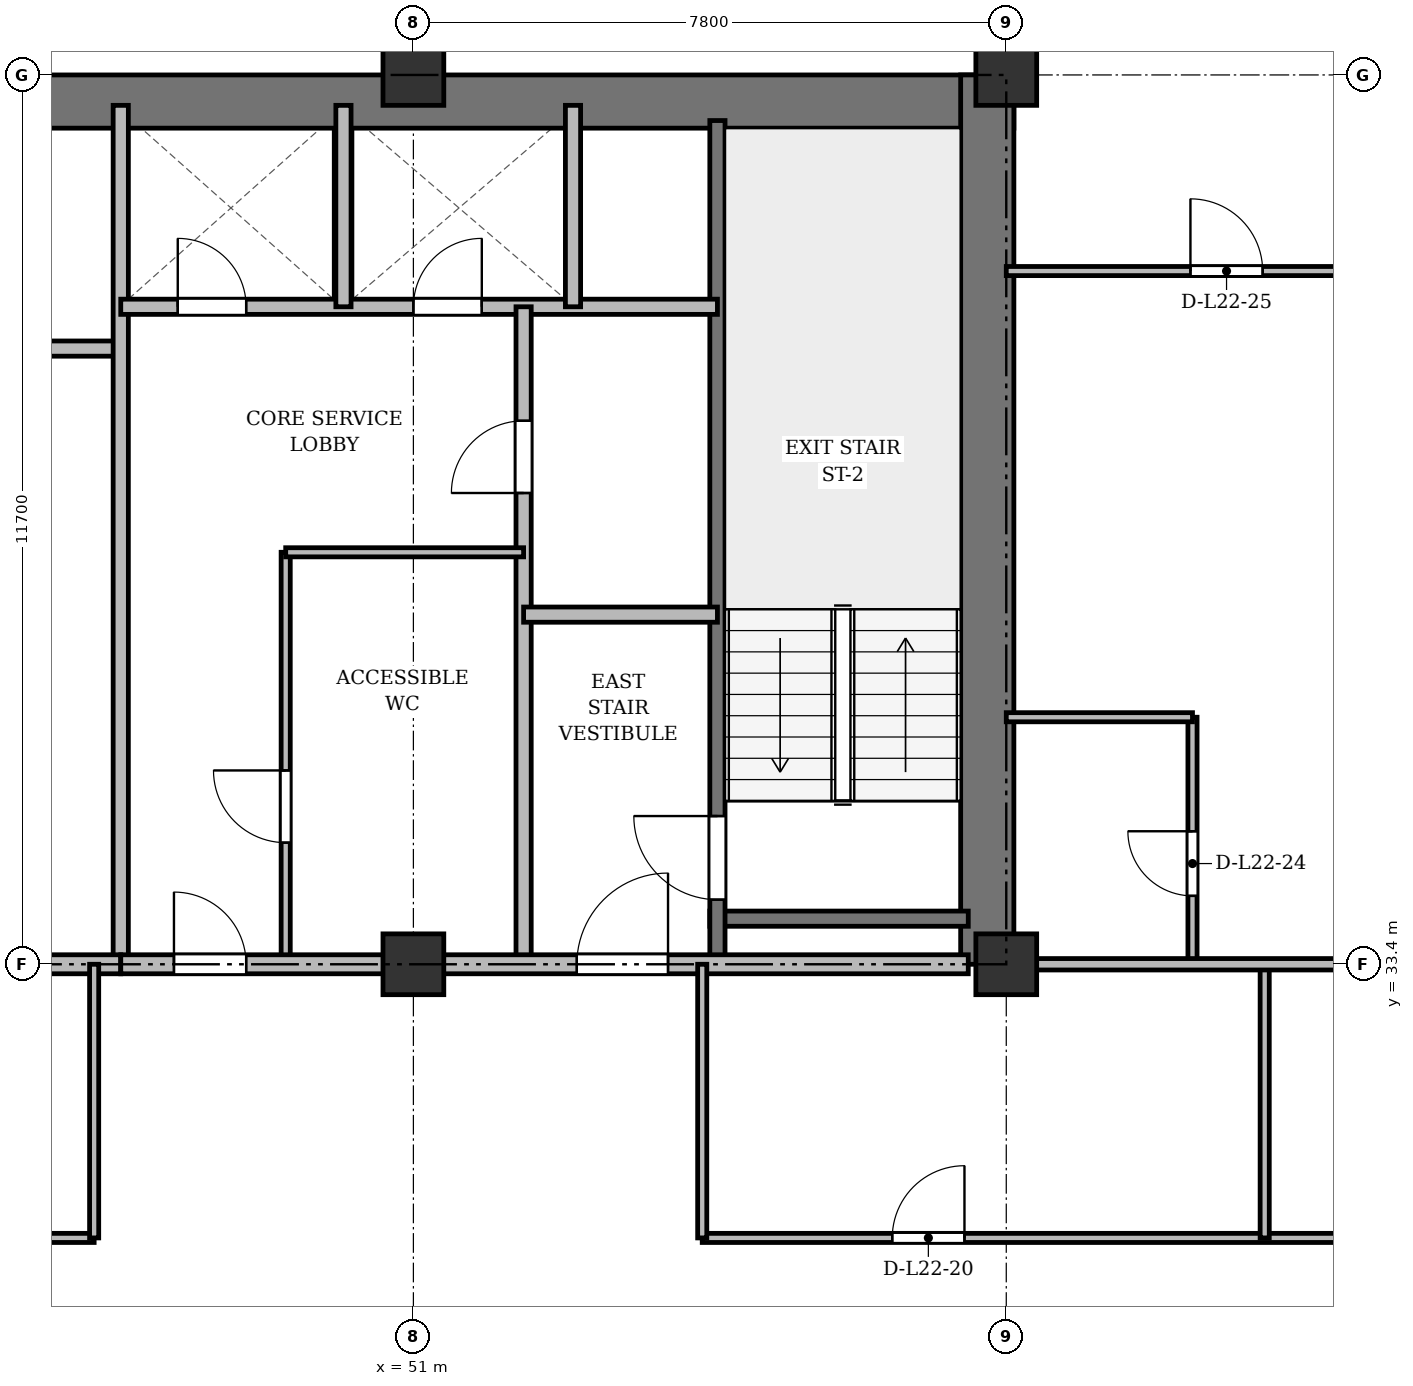
"""IFC4 building model, lengths in metres.
Left out: names, types, materials, properties, quantities, classifications, styles, units other than length and angle.
Written with IfcOpenShell. Run it as: python <this file> out.ifc"""

import sys

from ifc_helpers import new_model, si_unit, direction, frame, frame_2d, origin, origin_2d, place, context, subcontext, project, spatial, rectangle, extrude, source, transform, mapped, element, fill, save


model = new_model("IFC4")
c1 = context("Model", 3, precision=1e-05, world=origin(), true_north=direction((0.0, 1.0)))
c2 = subcontext(c1, "Body", "Model", "MODEL_VIEW")
j1 = project(units=[si_unit("LENGTHUNIT", "METRE"), si_unit("PLANEANGLEUNIT", "RADIAN")], contexts=[c1])
p1 = place(None, origin())
s1 = spatial("IfcSite", under=j1, at=p1, CompositionType="ELEMENT")
p2 = place(p1, origin())
s2 = spatial("IfcBuilding", under=s1, at=p2, CompositionType="ELEMENT")
p3 = place(p2, frame((0.0, 0.0, 88.9)))
s3 = spatial("IfcBuildingStorey", under=s2, at=p3, CompositionType="ELEMENT", Elevation=88.9)
m1 = source(origin(), c2, "Body", "SweptSolid", [
    extrude(rectangle(XDim=0.8, YDim=0.8, at=origin_2d()), origin(), (0.0, 0.0, 1.0), 3.6),
])
for number, where, z_axis, x_axis in (
    (1, (51.0, 33.4, 0.0), (0.0, 0.0, 1.0), (1.0, 0.0, 0.0)),
    (2, (51.0, 45.1, 0.0), (0.0, 0.0, 1.0), (1.0, 0.0, 0.0)),
    (3, (58.8, 33.4, 0.0), (0.0, 0.0, 1.0), (1.0, 0.0, 0.0)),
    (4, (58.8, 45.1, 0.0), (0.0, 0.0, 1.0), (1.0, 0.0, 0.0)),
):
    element("IfcColumn", number, at=place(p3, frame(where, z_axis=z_axis, x_axis=x_axis)), inside=s3, PredefinedType="COLUMN", context=c2, shape_type="MappedRepresentation", body=[
        mapped(m1, transform((0.0, 0.0, 0.0), x_axis=(1.0, 0.0, 0.0), y_axis=(0.0, 1.0, 0.0), z_axis=(0.0, 0.0, 1.0), scale=1.0)),
    ])
p4 = place(p3, frame((15.5, 44.75, 0.0), z_axis=(0.0, 0.0, 1.0), x_axis=(1.0, 0.0, 0.0)))
e5 = element("IfcWall", 5, at=p4, inside=s3, PredefinedType="SHEAR", context=c2, shape_type="SweptSolid", body=[
    extrude(rectangle(XDim=43.4, YDim=0.7, at=frame_2d((21.7, 0.0))), origin(), (0.0, 0.0, 1.0), 3.34),
])
p5 = place(p3, frame((58.55, 33.4, 0.0), z_axis=(0.0, 0.0, 1.0), x_axis=(0.0, 1.0, 0.0)))
e6 = element("IfcWall", 6, at=p5, inside=s3, PredefinedType="SHEAR", context=c2, shape_type="SweptSolid", body=[
    extrude(rectangle(XDim=11.7, YDim=0.7, at=frame_2d((5.85, 0.0))), origin(), (0.0, 0.0, 1.0), 3.34),
])
p6 = place(p3, frame((54.9, 34.0, 0.0), z_axis=(0.0, 0.0, 1.0), x_axis=(1.0, 0.0, 0.0)))
e7 = element("IfcWall", 7, at=p6, inside=s3, PredefinedType="SHEAR", context=c2, shape_type="SweptSolid", body=[
    extrude(rectangle(XDim=3.4, YDim=0.2, at=frame_2d((1.7, 0.0))), origin(), (0.0, 0.0, 1.0), 3.34),
])
p7 = place(p3, frame((55.0, 33.4, 0.0), z_axis=(0.0, 0.0, 1.0), x_axis=(0.0, 1.0, 0.0)))
e8 = element("IfcWall", 8, at=p7, inside=s3, PredefinedType="SHEAR", context=c2, shape_type="SweptSolid", body=[
    extrude(rectangle(XDim=11.1, YDim=0.2, at=frame_2d((5.55, 0.0))), origin(), (0.0, 0.0, 1.0), 3.34),
])
p8 = place(p7, frame((0.85, 0.0, 0.0)))
e9 = element("IfcOpeningElement", 9, at=p8, cuts=e8, PredefinedType="OPENING", context=c2, shape_type="SweptSolid", body=[
    extrude(rectangle(XDim=1.1, YDim=2.15, at=frame_2d((0.55, 1.075))), frame((0.0, 0.11, 0.0), z_axis=(0.0, -1.0, 0.0), x_axis=(1.0, 0.0, 0.0)), (0.0, 0.0, 1.0), 0.22),
])
p9 = place(p3, frame((40.25, 41.5, 0.0), z_axis=(0.0, 0.0, 1.0), x_axis=(1.0, 0.0, 0.0)))
e10 = element("IfcWall", 10, at=p9, inside=s3, PredefinedType="SOLIDWALL", context=c2, shape_type="SweptSolid", body=[
    extrude(rectangle(XDim=6.9, YDim=0.2, at=frame_2d((3.45, 0.0))), origin(), (0.0, 0.0, 1.0), 2.84),
])
p10 = place(p3, frame((47.15, 33.4, 0.0), z_axis=(0.0, 0.0, 1.0), x_axis=(0.0, 1.0, 0.0)))
e11 = element("IfcWall", 11, at=p10, inside=s3, PredefinedType="SOLIDWALL", context=c2, shape_type="SweptSolid", body=[
    extrude(rectangle(XDim=11.3, YDim=0.2, at=frame_2d((5.65, 0.0))), origin(), (0.0, 0.0, 1.0), 2.752),
])
p11 = place(p3, frame((26.3, 33.4, 0.0), z_axis=(0.0, 0.0, 1.0), x_axis=(1.0, 0.0, 0.0)))
e12 = element("IfcWall", 12, at=p11, inside=s3, PredefinedType="PARTITIONING", context=c2, shape_type="SweptSolid", body=[
    extrude(rectangle(XDim=20.85, YDim=0.25, at=frame_2d((10.425, 0.0))), origin(), (0.0, 0.0, 1.0), 2.752),
])
p12 = place(p11, frame((9.2, 0.0, 0.0)))
e13 = element("IfcOpeningElement", 13, at=p12, cuts=e12, PredefinedType="OPENING", context=c2, shape_type="SweptSolid", body=[
    extrude(rectangle(XDim=1.6, YDim=2.2, at=frame_2d((0.8, 1.1))), frame((0.0, 0.135, 0.0), z_axis=(0.0, -1.0, 0.0), x_axis=(1.0, 0.0, 0.0)), (0.0, 0.0, 1.0), 0.27),
])
p13 = place(p3, frame((47.15, 42.05, 0.0), z_axis=(0.0, 0.0, 1.0), x_axis=(1.0, 0.0, 0.0)))
e14 = element("IfcWall", 14, at=p13, inside=s3, PredefinedType="SOLIDWALL", context=c2, shape_type="SweptSolid", body=[
    extrude(rectangle(XDim=7.85, YDim=0.2, at=frame_2d((3.925, 0.0))), origin(), (0.0, 0.0, 1.0), 2.84),
])
p14 = place(p13, frame((0.75, 0.0, 0.0)))
e15 = element("IfcOpeningElement", 15, at=p14, cuts=e14, PredefinedType="OPENING", context=c2, shape_type="SweptSolid", body=[
    extrude(rectangle(XDim=0.9, YDim=2.1, at=frame_2d((0.45, 1.05))), frame((0.0, 0.11, 0.0), z_axis=(0.0, -1.0, 0.0), x_axis=(1.0, 0.0, 0.0)), (0.0, 0.0, 1.0), 0.22),
])
p15 = place(p13, frame((3.85, 0.0, 0.0)))
e16 = element("IfcOpeningElement", 16, at=p15, cuts=e14, PredefinedType="OPENING", context=c2, shape_type="SweptSolid", body=[
    extrude(rectangle(XDim=0.9, YDim=2.1, at=frame_2d((0.45, 1.05))), frame((0.0, 0.11, 0.0), z_axis=(0.0, -1.0, 0.0), x_axis=(1.0, 0.0, 0.0)), (0.0, 0.0, 1.0), 0.22),
])
for number, where, z_axis, x_axis in (
    (17, (50.08, 42.05, 0.0), (0.0, 0.0, 1.0), (0.0, 1.0, 0.0)),
    (18, (53.1, 42.05, 0.0), (0.0, 0.0, 1.0), (0.0, 1.0, 0.0)),
):
    element("IfcWall", number, at=place(p3, frame(where, z_axis=z_axis, x_axis=x_axis)), inside=s3, PredefinedType="SOLIDWALL", context=c2, shape_type="SweptSolid", body=[
        extrude(rectangle(XDim=2.65, YDim=0.2, at=frame_2d((1.325, 0.0))), origin(), (0.0, 0.0, 1.0), 3.34),
    ])
p16 = place(p3, frame((52.45, 33.4, 0.0), z_axis=(0.0, 0.0, 1.0), x_axis=(0.0, 1.0, 0.0)))
e19 = element("IfcWall", 19, at=p16, inside=s3, PredefinedType="PARTITIONING", context=c2, shape_type="SweptSolid", body=[
    extrude(rectangle(XDim=8.65, YDim=0.2, at=frame_2d((4.325, 0.0))), origin(), (0.0, 0.0, 1.0), 2.752),
])
p17 = place(p16, frame((6.2, 0.0, 0.0)))
e20 = element("IfcOpeningElement", 20, at=p17, cuts=e19, PredefinedType="OPENING", context=c2, shape_type="SweptSolid", body=[
    extrude(rectangle(XDim=0.95, YDim=2.15, at=frame_2d((0.475, 1.075))), frame((0.0, 0.11, 0.0), z_axis=(0.0, -1.0, 0.0), x_axis=(1.0, 0.0, 0.0)), (0.0, 0.0, 1.0), 0.22),
])
p18 = place(p3, frame((52.45, 38.0, 0.0), z_axis=(0.0, 0.0, 1.0), x_axis=(1.0, 0.0, 0.0)))
e21 = element("IfcWall", 21, at=p18, inside=s3, PredefinedType="PARTITIONING", context=c2, shape_type="SweptSolid", body=[
    extrude(rectangle(XDim=2.55, YDim=0.2, at=frame_2d((1.275, 0.0))), origin(), (0.0, 0.0, 1.0), 3.34),
])
p19 = place(p3, frame((49.32, 33.4, 0.0), z_axis=(0.0, 0.0, 1.0), x_axis=(0.0, 1.0, 0.0)))
e22 = element("IfcWall", 22, at=p19, inside=s3, PredefinedType="PARTITIONING", context=c2, shape_type="SweptSolid", body=[
    extrude(rectangle(XDim=5.42, YDim=0.12, at=frame_2d((2.71, 0.0))), origin(), (0.0, 0.0, 1.0), 2.752),
])
p20 = place(p19, frame((1.6, 0.0, 0.0)))
e23 = element("IfcOpeningElement", 23, at=p20, cuts=e22, PredefinedType="OPENING", context=c2, shape_type="SweptSolid", body=[
    extrude(rectangle(XDim=0.95, YDim=2.15, at=frame_2d((0.475, 1.075))), frame((0.0, 0.07, 0.0), z_axis=(0.0, -1.0, 0.0), x_axis=(1.0, 0.0, 0.0)), (0.0, 0.0, 1.0), 0.14),
])
p21 = place(p3, frame((49.32, 38.82, 0.0), z_axis=(0.0, 0.0, 1.0), x_axis=(1.0, 0.0, 0.0)))
e24 = element("IfcWall", 24, at=p21, inside=s3, PredefinedType="PARTITIONING", context=c2, shape_type="SweptSolid", body=[
    extrude(rectangle(XDim=3.13, YDim=0.12, at=frame_2d((1.565, 0.0))), origin(), (0.0, 0.0, 1.0), 2.84),
])
p22 = place(p3, frame((47.15, 33.4, 0.0), z_axis=(0.0, 0.0, 1.0), x_axis=(1.0, 0.0, 0.0)))
e25 = element("IfcWall", 25, at=p22, inside=s3, PredefinedType="PARTITIONING", context=c2, shape_type="SweptSolid", body=[
    extrude(rectangle(XDim=11.15, YDim=0.25, at=frame_2d((5.575, 0.0))), origin(), (0.0, 0.0, 1.0), 2.752),
])
p23 = place(p22, frame((0.7, 0.0, 0.0)))
e26 = element("IfcOpeningElement", 26, at=p23, cuts=e25, PredefinedType="OPENING", context=c2, shape_type="SweptSolid", body=[
    extrude(rectangle(XDim=0.95, YDim=2.15, at=frame_2d((0.475, 1.075))), frame((0.0, 0.135, 0.0), z_axis=(0.0, -1.0, 0.0), x_axis=(1.0, 0.0, 0.0)), (0.0, 0.0, 1.0), 0.27),
])
p24 = place(p22, frame((6.0, 0.0, 0.0)))
e27 = element("IfcOpeningElement", 27, at=p24, cuts=e25, PredefinedType="OPENING", context=c2, shape_type="SweptSolid", body=[
    extrude(rectangle(XDim=1.2, YDim=2.15, at=frame_2d((0.6, 1.075))), frame((0.0, 0.135, 0.0), z_axis=(0.0, -1.0, 0.0), x_axis=(1.0, 0.0, 0.0)), (0.0, 0.0, 1.0), 0.27),
])
p25 = place(p3, frame((38.2, 29.8, 0.0), z_axis=(0.0, 0.0, 1.0), x_axis=(1.0, 0.0, 0.0)))
e28 = element("IfcWall", 28, at=p25, inside=s3, PredefinedType="PARTITIONING", context=c2, shape_type="SweptSolid", body=[
    extrude(rectangle(XDim=8.6, YDim=0.12, at=frame_2d((4.3, 0.0))), origin(), (0.0, 0.0, 1.0), 2.84),
])
p26 = place(p25, frame((3.462, 0.0, 0.0)))
e29 = element("IfcOpeningElement", 29, at=p26, cuts=e28, PredefinedType="OPENING", context=c2, shape_type="SweptSolid", body=[
    extrude(rectangle(XDim=0.95, YDim=2.15, at=frame_2d((0.475, 1.075))), frame((0.0, 0.07, 0.0), z_axis=(0.0, -1.0, 0.0), x_axis=(1.0, 0.0, 0.0)), (0.0, 0.0, 1.0), 0.14),
])
p27 = place(p3, frame((54.8, 29.8, 0.0), z_axis=(0.0, 0.0, 1.0), x_axis=(1.0, 0.0, 0.0)))
e30 = element("IfcWall", 30, at=p27, inside=s3, PredefinedType="PARTITIONING", context=c2, shape_type="SweptSolid", body=[
    extrude(rectangle(XDim=14.85, YDim=0.12, at=frame_2d((7.425, 0.0))), origin(), (0.0, 0.0, 1.0), 2.84),
])
p28 = place(p27, frame((2.5, 0.0, 0.0)))
e31 = element("IfcOpeningElement", 31, at=p28, cuts=e30, PredefinedType="OPENING", context=c2, shape_type="SweptSolid", body=[
    extrude(rectangle(XDim=0.95, YDim=2.15, at=frame_2d((0.475, 1.075))), frame((0.0, 0.07, 0.0), z_axis=(0.0, -1.0, 0.0), x_axis=(1.0, 0.0, 0.0)), (0.0, 0.0, 1.0), 0.14),
])
p29 = place(p27, frame((9.2, 0.0, 0.0)))
e32 = element("IfcOpeningElement", 32, at=p29, cuts=e30, PredefinedType="OPENING", context=c2, shape_type="SweptSolid", body=[
    extrude(rectangle(XDim=0.95, YDim=2.15, at=frame_2d((0.475, 1.075))), frame((0.0, 0.07, 0.0), z_axis=(0.0, -1.0, 0.0), x_axis=(1.0, 0.0, 0.0)), (0.0, 0.0, 1.0), 0.14),
])
for number, where, z_axis, x_axis in (
    (33, (62.2, 29.8, 0.0), (0.0, 0.0, 1.0), (0.0, 1.0, 0.0)),
    (34, (46.8, 29.8, 0.0), (0.0, 0.0, 1.0), (0.0, 1.0, 0.0)),
    (35, (54.8, 29.8, 0.0), (0.0, 0.0, 1.0), (0.0, 1.0, 0.0)),
):
    element("IfcWall", number, at=place(p3, frame(where, z_axis=z_axis, x_axis=x_axis)), inside=s3, PredefinedType="PARTITIONING", context=c2, shape_type="SweptSolid", body=[
        extrude(rectangle(XDim=3.6, YDim=0.12, at=frame_2d((1.8, 0.0))), origin(), (0.0, 0.0, 1.0), 2.752),
    ])
p30 = place(p3, frame((61.25, 33.4, 0.0), z_axis=(0.0, 0.0, 1.0), x_axis=(0.0, 1.0, 0.0)))
e36 = element("IfcWall", 36, at=p30, inside=s3, PredefinedType="PARTITIONING", context=c2, shape_type="SweptSolid", body=[
    extrude(rectangle(XDim=3.25, YDim=0.12, at=frame_2d((1.625, 0.0))), origin(), (0.0, 0.0, 1.0), 2.752),
])
p31 = place(p30, frame((0.9, 0.0, 0.0)))
e37 = element("IfcOpeningElement", 37, at=p31, cuts=e36, PredefinedType="OPENING", context=c2, shape_type="SweptSolid", body=[
    extrude(rectangle(XDim=0.85, YDim=2.1, at=frame_2d((0.425, 1.05))), frame((0.0, 0.07, 0.0), z_axis=(0.0, -1.0, 0.0), x_axis=(1.0, 0.0, 0.0)), (0.0, 0.0, 1.0), 0.14),
])
p32 = place(p3, frame((58.8, 36.65, 0.0), z_axis=(0.0, 0.0, 1.0), x_axis=(1.0, 0.0, 0.0)))
e38 = element("IfcWall", 38, at=p32, inside=s3, PredefinedType="PARTITIONING", context=c2, shape_type="SweptSolid", body=[
    extrude(rectangle(XDim=2.45, YDim=0.12, at=frame_2d((1.225, 0.0))), origin(), (0.0, 0.0, 1.0), 2.84),
])
p33 = place(p3, frame((58.8, 42.52, 0.0), z_axis=(0.0, 0.0, 1.0), x_axis=(1.0, 0.0, 0.0)))
e39 = element("IfcWall", 39, at=p33, inside=s3, PredefinedType="PARTITIONING", context=c2, shape_type="SweptSolid", body=[
    extrude(rectangle(XDim=5.425, YDim=0.12, at=frame_2d((2.712, 0.0))), origin(), (0.0, 0.0, 1.0), 2.84),
])
p34 = place(p33, frame((2.423, 0.0, 0.0)))
e40 = element("IfcOpeningElement", 40, at=p34, cuts=e39, PredefinedType="OPENING", context=c2, shape_type="SweptSolid", body=[
    extrude(rectangle(XDim=0.95, YDim=2.15, at=frame_2d((0.475, 1.075))), frame((0.0, 0.07, 0.0), z_axis=(0.0, -1.0, 0.0), x_axis=(1.0, 0.0, 0.0)), (0.0, 0.0, 1.0), 0.14),
])
p35 = place(p3, frame((58.8, 33.4, 0.0), z_axis=(0.0, 0.0, 1.0), x_axis=(1.0, 0.0, 0.0)))
e41 = element("IfcWall", 41, at=p35, inside=s3, PredefinedType="PARTITIONING", context=c2, shape_type="SweptSolid", body=[
    extrude(rectangle(XDim=10.85, YDim=0.15, at=frame_2d((5.425, 0.0))), origin(), (0.0, 0.0, 1.0), 2.752),
])
p36 = place(p35, frame((4.933, 0.0, 0.0)))
e42 = element("IfcOpeningElement", 42, at=p36, cuts=e41, PredefinedType="OPENING", context=c2, shape_type="SweptSolid", body=[
    extrude(rectangle(XDim=0.95, YDim=2.15, at=frame_2d((0.475, 1.075))), frame((0.0, 0.085, 0.0), z_axis=(0.0, -1.0, 0.0), x_axis=(1.0, 0.0, 0.0)), (0.0, 0.0, 1.0), 0.17),
])
p37 = place(p3, frame((58.8, 44.75, 0.0), z_axis=(0.0, 0.0, 1.0), x_axis=(0.0, 1.0, 0.0)))
e43 = element("IfcWall", 43, at=p37, inside=s3, PredefinedType="PARTITIONING", context=c2, shape_type="SweptSolid", body=[
    extrude(rectangle(XDim=3.61, YDim=0.15, at=frame_2d((1.805, 0.0))), origin(), (0.0, 0.0, 1.0), 2.84),
])
p38 = place(p37, frame((1.1, 0.0, 0.0)))
e44 = element("IfcOpeningElement", 44, at=p38, cuts=e43, PredefinedType="OPENING", context=c2, shape_type="SweptSolid", body=[
    extrude(rectangle(XDim=0.95, YDim=2.15, at=frame_2d((0.475, 1.075))), frame((0.0, 0.085, 0.0), z_axis=(0.0, -1.0, 0.0), x_axis=(1.0, 0.0, 0.0)), (0.0, 0.0, 1.0), 0.17),
])
m2 = source(origin(), c2, "Body", "SweptSolid", [
    extrude(rectangle(XDim=1.1, YDim=2.15, at=frame_2d((0.55, 1.075))), frame((0.0, 0.025, 0.0), z_axis=(0.0, -1.0, 0.0), x_axis=(1.0, 0.0, 0.0)), (0.0, 0.0, 1.0), 0.05),
])
p39 = place(p8, origin())
e45 = element("IfcDoor", 45, at=p39, inside=s3, OperationType="SINGLE_SWING_RIGHT", PredefinedType="DOOR", context=c2, shape_type="MappedRepresentation", body=[
    mapped(m2, transform((0.0, 0.0, 0.0), x_axis=(1.0, 0.0, 0.0), y_axis=(0.0, 1.0, 0.0), z_axis=(0.0, 0.0, 1.0), scale=1.0)),
])
fill(e9, e45)
m3 = source(origin(), c2, "Body", "SweptSolid", [
    extrude(rectangle(XDim=0.9, YDim=2.1, at=frame_2d((0.45, 1.05))), frame((0.0, 0.025, 0.0), z_axis=(0.0, -1.0, 0.0), x_axis=(1.0, 0.0, 0.0)), (0.0, 0.0, 1.0), 0.05),
])
p40 = place(p14, origin())
e46 = element("IfcDoor", 46, at=p40, inside=s3, OperationType="SINGLE_SWING_LEFT", PredefinedType="DOOR", context=c2, shape_type="MappedRepresentation", body=[
    mapped(m3, transform((0.0, 0.0, 0.0), x_axis=(1.0, 0.0, 0.0), y_axis=(0.0, 1.0, 0.0), z_axis=(0.0, 0.0, 1.0), scale=1.0)),
])
fill(e15, e46)
p41 = place(p15, origin())
e47 = element("IfcDoor", 47, at=p41, inside=s3, OperationType="SINGLE_SWING_RIGHT", PredefinedType="DOOR", context=c2, shape_type="MappedRepresentation", body=[
    mapped(m3, transform((0.0, 0.0, 0.0), x_axis=(1.0, 0.0, 0.0), y_axis=(0.0, 1.0, 0.0), z_axis=(0.0, 0.0, 1.0), scale=1.0)),
])
fill(e16, e47)
m4 = source(origin(), c2, "Body", "SweptSolid", [
    extrude(rectangle(XDim=0.95, YDim=2.15, at=frame_2d((0.475, 1.075))), frame((0.0, 0.025, 0.0), z_axis=(0.0, -1.0, 0.0), x_axis=(1.0, 0.0, 0.0)), (0.0, 0.0, 1.0), 0.05),
])
p42 = place(p17, origin())
e48 = element("IfcDoor", 48, at=p42, inside=s3, OperationType="SINGLE_SWING_LEFT", PredefinedType="DOOR", context=c2, shape_type="MappedRepresentation", body=[
    mapped(m4, transform((0.0, 0.0, 0.0), x_axis=(1.0, 0.0, 0.0), y_axis=(0.0, 1.0, 0.0), z_axis=(0.0, 0.0, 1.0), scale=1.0)),
])
fill(e20, e48)
p43 = place(p20, origin())
e49 = element("IfcDoor", 49, at=p43, inside=s3, OperationType="SINGLE_SWING_RIGHT", PredefinedType="DOOR", context=c2, shape_type="MappedRepresentation", body=[
    mapped(m4, transform((0.0, 0.0, 0.0), x_axis=(1.0, 0.0, 0.0), y_axis=(0.0, 1.0, 0.0), z_axis=(0.0, 0.0, 1.0), scale=1.0)),
])
fill(e23, e49)
p44 = place(p23, origin())
e50 = element("IfcDoor", 50, at=p44, inside=s3, OperationType="SINGLE_SWING_LEFT", PredefinedType="DOOR", context=c2, shape_type="MappedRepresentation", body=[
    mapped(m4, transform((0.0, 0.0, 0.0), x_axis=(1.0, 0.0, 0.0), y_axis=(0.0, 1.0, 0.0), z_axis=(0.0, 0.0, 1.0), scale=1.0)),
])
fill(e26, e50)
m5 = source(origin(), c2, "Body", "SweptSolid", [
    extrude(rectangle(XDim=1.2, YDim=2.15, at=frame_2d((0.6, 1.075))), frame((0.0, 0.025, 0.0), z_axis=(0.0, -1.0, 0.0), x_axis=(1.0, 0.0, 0.0)), (0.0, 0.0, 1.0), 0.05),
])
p45 = place(p24, origin())
e51 = element("IfcDoor", 51, at=p45, inside=s3, OperationType="SINGLE_SWING_RIGHT", PredefinedType="DOOR", context=c2, shape_type="MappedRepresentation", body=[
    mapped(m5, transform((0.0, 0.0, 0.0), x_axis=(1.0, 0.0, 0.0), y_axis=(0.0, 1.0, 0.0), z_axis=(0.0, 0.0, 1.0), scale=1.0)),
])
fill(e27, e51)
p46 = place(p28, origin())
e52 = element("IfcDoor", 52, at=p46, inside=s3, OperationType="SINGLE_SWING_RIGHT", PredefinedType="DOOR", context=c2, shape_type="MappedRepresentation", body=[
    mapped(m4, transform((0.0, 0.0, 0.0), x_axis=(1.0, 0.0, 0.0), y_axis=(0.0, 1.0, 0.0), z_axis=(0.0, 0.0, 1.0), scale=1.0)),
])
fill(e31, e52)
m6 = source(origin(), c2, "Body", "SweptSolid", [
    extrude(rectangle(XDim=0.85, YDim=2.1, at=frame_2d((0.425, 1.05))), frame((0.0, 0.025, 0.0), z_axis=(0.0, -1.0, 0.0), x_axis=(1.0, 0.0, 0.0)), (0.0, 0.0, 1.0), 0.05),
])
p47 = place(p31, origin())
e53 = element("IfcDoor", 53, at=p47, inside=s3, OperationType="SINGLE_SWING_RIGHT", PredefinedType="DOOR", context=c2, shape_type="MappedRepresentation", body=[
    mapped(m6, transform((0.0, 0.0, 0.0), x_axis=(1.0, 0.0, 0.0), y_axis=(0.0, 1.0, 0.0), z_axis=(0.0, 0.0, 1.0), scale=1.0)),
])
fill(e37, e53)
p48 = place(p34, origin())
e54 = element("IfcDoor", 54, at=p48, inside=s3, OperationType="SINGLE_SWING_LEFT", PredefinedType="DOOR", context=c2, shape_type="MappedRepresentation", body=[
    mapped(m4, transform((0.0, 0.0, 0.0), x_axis=(1.0, 0.0, 0.0), y_axis=(0.0, 1.0, 0.0), z_axis=(0.0, 0.0, 1.0), scale=1.0)),
])
fill(e40, e54)
save(model, sys.argv[1])
